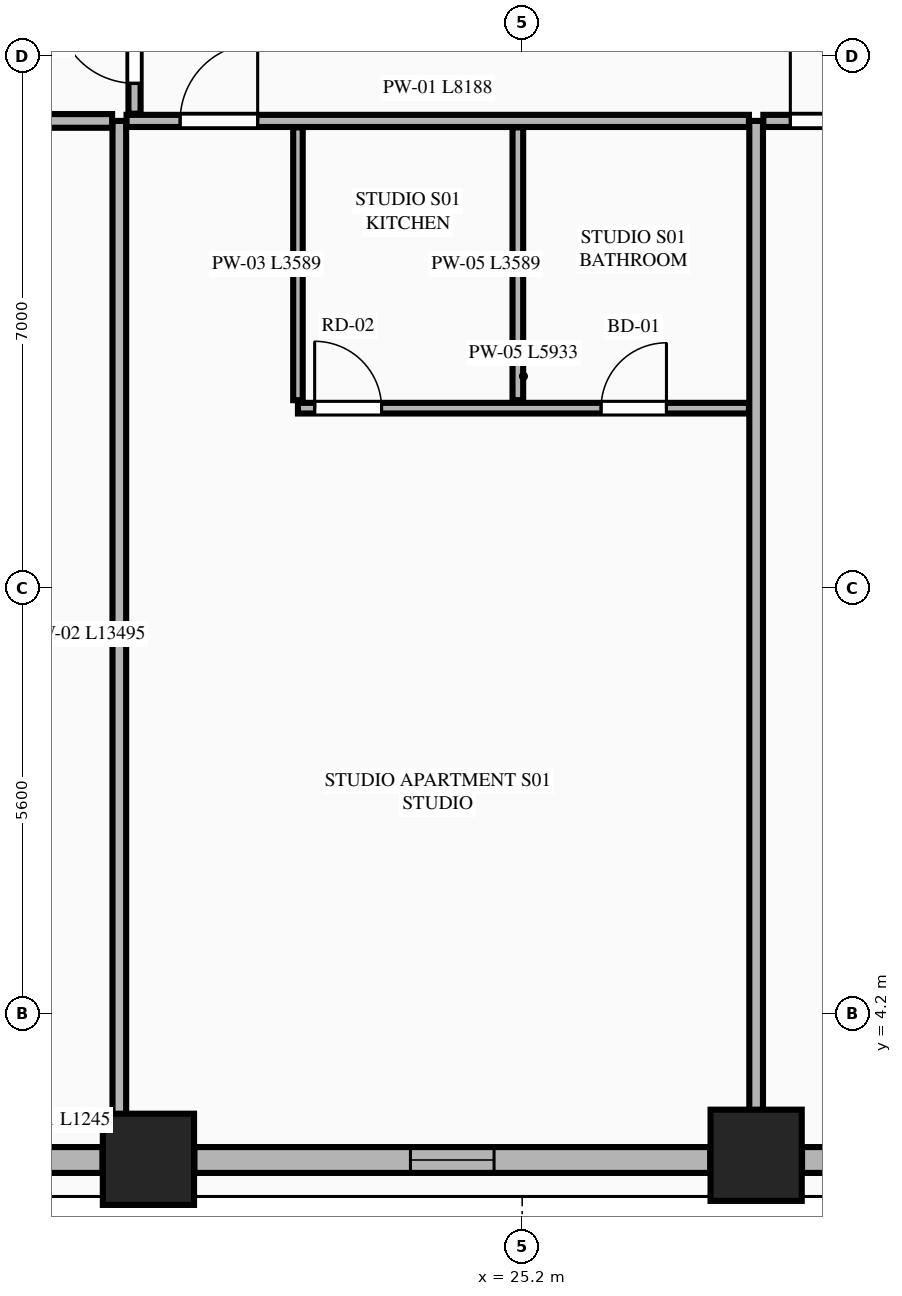
"""IFC4 building model, lengths in metres.
Left out: names, types, materials, properties, quantities, classifications, styles, units other than length and angle.
Written with IfcOpenShell. Run it as: python <this file> out.ifc"""

import sys

from ifc_helpers import new_model, si_unit, direction, frame, frame_2d, origin, origin_2d, place, context, subcontext, project, spatial, rectangle, extrude, element, fill, save


model = new_model("IFC4")
c1 = context("Model", 3, precision=1e-05, world=origin(), true_north=direction((0.0, 1.0)))
c2 = subcontext(c1, "Body", "Model", "MODEL_VIEW")
j1 = project(units=[si_unit("LENGTHUNIT", "METRE"), si_unit("PLANEANGLEUNIT", "RADIAN")], contexts=[c1])
p1 = place(None, origin())
s1 = spatial("IfcSite", under=j1, at=p1, CompositionType="ELEMENT")
p2 = place(p1, origin())
s2 = spatial("IfcBuilding", under=s1, at=p2, CompositionType="ELEMENT")
p3 = place(p2, frame((0.0, 0.0, 60.4)))
s3 = spatial("IfcBuildingStorey", under=s2, at=p3, CompositionType="ELEMENT", Elevation=60.4)
for number, where, z_axis, x_axis in (
    (1, (20.283, 2.289, 0.0), (0.0, 0.0, 1.0), (1.0, 0.0, 0.0)),
    (2, (28.278, 2.342, 0.0), (0.0, 0.0, 1.0), (1.0, 0.0, 0.0)),
):
    element("IfcColumn", number, at=place(p3, frame(where, z_axis=z_axis, x_axis=x_axis)), inside=s3, PredefinedType="COLUMN", context=c2, shape_type="SweptSolid", body=[
        extrude(rectangle(XDim=1.2, YDim=1.2, at=origin_2d()), origin(), (0.0, 0.0, 1.0), 3.55),
    ])
p4 = place(p3, frame((18.434, 2.28, 0.0), z_axis=(0.0, 0.0, 1.0), x_axis=(1.0, 0.0, 0.0)))
e3 = element("IfcWall", 3, at=p4, inside=s3, PredefinedType="STANDARD", context=c2, shape_type="SweptSolid", body=[
    extrude(rectangle(XDim=1.245, YDim=0.34, at=frame_2d((0.623, 0.0))), origin(), (0.0, 0.0, 1.0), 3.33),
])
p5 = place(p3, frame((20.887, 2.28, 0.0), z_axis=(0.0, 0.0, 1.0), x_axis=(1.0, 0.0, 0.0)))
e4 = element("IfcWall", 4, at=p5, inside=s3, PredefinedType="STANDARD", context=c2, shape_type="SweptSolid", body=[
    extrude(rectangle(XDim=6.787, YDim=0.34, at=frame_2d((3.394, 0.0))), origin(), (0.0, 0.0, 1.0), 2.787),
])
p6 = place(p5, frame((2.843, 0.0, 0.75)))
e5 = element("IfcOpeningElement", 5, at=p6, cuts=e4, PredefinedType="OPENING", context=c2, shape_type="SweptSolid", body=[
    extrude(rectangle(XDim=1.1, YDim=1.887, at=frame_2d((0.55, 0.943))), frame((0.0, 0.18, 0.0), z_axis=(0.0, -1.0, 0.0), x_axis=(1.0, 0.0, 0.0)), (0.0, 0.0, 1.0), 0.36),
])
p7 = place(p3, frame((28.882, 2.28, 0.0), z_axis=(0.0, 0.0, 1.0), x_axis=(1.0, 0.0, 0.0)))
e6 = element("IfcWall", 6, at=p7, inside=s3, PredefinedType="STANDARD", context=c2, shape_type="SweptSolid", body=[
    extrude(rectangle(XDim=7.036, YDim=0.34, at=frame_2d((3.518, 0.0))), origin(), (0.0, 0.0, 1.0), 2.787),
])
p8 = place(p7, frame((2.968, 0.0, 0.75)))
e7 = element("IfcOpeningElement", 7, at=p8, cuts=e6, PredefinedType="OPENING", context=c2, shape_type="SweptSolid", body=[
    extrude(rectangle(XDim=1.1, YDim=1.887, at=frame_2d((0.55, 0.943))), frame((0.0, 0.18, 0.0), z_axis=(0.0, -1.0, 0.0), x_axis=(1.0, 0.0, 0.0)), (0.0, 0.0, 1.0), 0.36),
])
p9 = place(p3, frame((19.9, 2.455, 0.0), z_axis=(0.0, 0.0, 1.0), x_axis=(0.0, 1.0, 0.0)))
e8 = element("IfcWall", 8, at=p9, inside=s3, PredefinedType="PARTITIONING", context=c2, shape_type="SweptSolid", body=[
    extrude(rectangle(XDim=13.495, YDim=0.18, at=frame_2d((6.748, 0.0))), origin(), (0.0, 0.0, 1.0), 3.33),
])
p10 = place(p3, frame((28.278, 2.455, 0.0), z_axis=(0.0, 0.0, 1.0), x_axis=(0.0, 1.0, 0.0)))
e9 = element("IfcWall", 9, at=p10, inside=s3, PredefinedType="PARTITIONING", context=c2, shape_type="SweptSolid", body=[
    extrude(rectangle(XDim=13.495, YDim=0.18, at=frame_2d((6.748, 0.0))), origin(), (0.0, 0.0, 1.0), 2.636),
])
p11 = place(p3, frame((19.995, 15.95, 0.0), z_axis=(0.0, 0.0, 1.0), x_axis=(1.0, 0.0, 0.0)))
e10 = element("IfcWall", 10, at=p11, inside=s3, PredefinedType="PARTITIONING", context=c2, shape_type="SweptSolid", body=[
    extrude(rectangle(XDim=8.188, YDim=0.16, at=frame_2d((4.094, 0.0))), origin(), (0.0, 0.0, 1.0), 3.33),
])
p12 = place(p11, frame((0.705, 0.0, 0.0)))
e11 = element("IfcOpeningElement", 11, at=p12, cuts=e10, PredefinedType="OPENING", context=c2, shape_type="SweptSolid", body=[
    extrude(rectangle(XDim=1.02, YDim=2.25, at=frame_2d((0.51, 1.125))), frame((0.0, 0.09, 0.0), z_axis=(0.0, -1.0, 0.0), x_axis=(1.0, 0.0, 0.0)), (0.0, 0.0, 1.0), 0.18),
])
p13 = place(p3, frame((22.25, 12.276, 0.0), z_axis=(0.0, 0.0, 1.0), x_axis=(0.0, 1.0, 0.0)))
e12 = element("IfcWall", 12, at=p13, inside=s3, PredefinedType="PARTITIONING", context=c2, shape_type="SweptSolid", body=[
    extrude(rectangle(XDim=3.589, YDim=0.125, at=frame_2d((1.794, 0.0))), origin(), (0.0, 0.0, 1.0), 2.636),
])
p14 = place(p3, frame((22.25, 12.171, 0.0), z_axis=(0.0, 0.0, 1.0), x_axis=(1.0, 0.0, 0.0)))
e13 = element("IfcWall", 13, at=p14, inside=s3, PredefinedType="PLUMBINGWALL", context=c2, shape_type="SweptSolid", body=[
    extrude(rectangle(XDim=5.933, YDim=0.14, at=frame_2d((2.967, 0.0))), origin(), (0.0, 0.0, 1.0), 3.33),
])
p15 = place(p14, frame((3.988, 0.0, 0.0)))
e14 = element("IfcOpeningElement", 14, at=p15, cuts=e13, PredefinedType="OPENING", context=c2, shape_type="SweptSolid", body=[
    extrude(rectangle(XDim=0.86, YDim=2.1, at=frame_2d((0.43, 1.05))), frame((0.0, 0.08, 0.0), z_axis=(0.0, -1.0, 0.0), x_axis=(1.0, 0.0, 0.0)), (0.0, 0.0, 1.0), 0.16),
])
p16 = place(p14, frame((0.22, 0.0, 0.0)))
e15 = element("IfcOpeningElement", 15, at=p16, cuts=e13, PredefinedType="OPENING", context=c2, shape_type="SweptSolid", body=[
    extrude(rectangle(XDim=0.88, YDim=2.15, at=frame_2d((0.44, 1.075))), frame((0.0, 0.08, 0.0), z_axis=(0.0, -1.0, 0.0), x_axis=(1.0, 0.0, 0.0)), (0.0, 0.0, 1.0), 0.16),
])
p17 = place(p3, frame((25.143, 12.276, 0.0), z_axis=(0.0, 0.0, 1.0), x_axis=(0.0, 1.0, 0.0)))
e16 = element("IfcWall", 16, at=p17, inside=s3, PredefinedType="PLUMBINGWALL", context=c2, shape_type="SweptSolid", body=[
    extrude(rectangle(XDim=3.589, YDim=0.14, at=frame_2d((1.794, 0.0))), origin(), (0.0, 0.0, 1.0), 3.33),
])
p18 = place(p3, frame((28.373, 15.95, 0.0), z_axis=(0.0, 0.0, 1.0), x_axis=(1.0, 0.0, 0.0)))
e17 = element("IfcWall", 17, at=p18, inside=s3, PredefinedType="PARTITIONING", context=c2, shape_type="SweptSolid", body=[
    extrude(rectangle(XDim=8.054, YDim=0.16, at=frame_2d((4.027, 0.0))), origin(), (0.0, 0.0, 1.0), 3.33),
])
p19 = place(p18, frame((0.355, 0.0, 0.0)))
e18 = element("IfcOpeningElement", 18, at=p19, cuts=e17, PredefinedType="OPENING", context=c2, shape_type="SweptSolid", body=[
    extrude(rectangle(XDim=1.02, YDim=2.25, at=frame_2d((0.51, 1.125))), frame((0.0, 0.09, 0.0), z_axis=(0.0, -1.0, 0.0), x_axis=(1.0, 0.0, 0.0)), (0.0, 0.0, 1.0), 0.18),
])
p20 = place(p3, frame((10.564, 15.95, 0.0), z_axis=(0.0, 0.0, 1.0), x_axis=(1.0, 0.0, 0.0)))
e19 = element("IfcWall", 19, at=p20, inside=s3, PredefinedType="PARTITIONING", context=c2, shape_type="SweptSolid", body=[
    extrude(rectangle(XDim=9.241, YDim=0.18, at=frame_2d((4.621, 0.0))), origin(), (0.0, 0.0, 1.0), 3.33),
])
p21 = place(p3, frame((20.1, 16.045, 0.0), z_axis=(0.0, 0.0, 1.0), x_axis=(0.0, 1.0, 0.0)))
e20 = element("IfcWall", 20, at=p21, inside=s3, PredefinedType="PARTITIONING", context=c2, shape_type="SweptSolid", body=[
    extrude(rectangle(XDim=19.71, YDim=0.16, at=frame_2d((9.855, 0.0))), origin(), (0.0, 0.0, 1.0), 3.33),
])
p22 = place(p21, frame((0.4, 0.0, 0.0)))
e21 = element("IfcOpeningElement", 21, at=p22, cuts=e20, PredefinedType="OPENING", context=c2, shape_type="SweptSolid", body=[
    extrude(rectangle(XDim=1.02, YDim=2.25, at=frame_2d((0.51, 1.125))), frame((0.0, 0.09, 0.0), z_axis=(0.0, -1.0, 0.0), x_axis=(1.0, 0.0, 0.0)), (0.0, 0.0, 1.0), 0.18),
])
p23 = place(p6, origin())
e22 = element("IfcWindow", 22, at=p23, inside=s3, PartitioningType="SINGLE_PANEL", PredefinedType="WINDOW", context=c2, shape_type="SweptSolid", body=[
    extrude(rectangle(XDim=1.1, YDim=1.887, at=frame_2d((0.55, 0.943))), frame((0.0, 0.03, 0.0), z_axis=(0.0, -1.0, 0.0), x_axis=(1.0, 0.0, 0.0)), (0.0, 0.0, 1.0), 0.06),
])
fill(e5, e22)
p24 = place(p15, origin())
e23 = element("IfcDoor", 23, at=p24, inside=s3, OperationType="SINGLE_SWING_RIGHT", PredefinedType="DOOR", context=c2, shape_type="SweptSolid", body=[
    extrude(rectangle(XDim=0.86, YDim=2.1, at=frame_2d((0.43, 1.05))), frame((0.0, 0.025, 0.0), z_axis=(0.0, -1.0, 0.0), x_axis=(1.0, 0.0, 0.0)), (0.0, 0.0, 1.0), 0.05),
])
fill(e14, e23)
p25 = place(p12, origin())
e24 = element("IfcDoor", 24, at=p25, inside=s3, OperationType="SINGLE_SWING_RIGHT", PredefinedType="DOOR", context=c2, shape_type="SweptSolid", body=[
    extrude(rectangle(XDim=1.02, YDim=2.25, at=frame_2d((0.51, 1.125))), frame((0.0, 0.025, 0.0), z_axis=(0.0, -1.0, 0.0), x_axis=(1.0, 0.0, 0.0)), (0.0, 0.0, 1.0), 0.05),
])
fill(e11, e24)
p26 = place(p16, origin())
e25 = element("IfcDoor", 25, at=p26, inside=s3, OperationType="SINGLE_SWING_LEFT", PredefinedType="DOOR", context=c2, shape_type="SweptSolid", body=[
    extrude(rectangle(XDim=0.88, YDim=2.15, at=frame_2d((0.44, 1.075))), frame((0.0, 0.025, 0.0), z_axis=(0.0, -1.0, 0.0), x_axis=(1.0, 0.0, 0.0)), (0.0, 0.0, 1.0), 0.05),
])
fill(e15, e25)
p27 = place(p19, origin())
e26 = element("IfcDoor", 26, at=p27, inside=s3, OperationType="SINGLE_SWING_LEFT", PredefinedType="DOOR", context=c2, shape_type="SweptSolid", body=[
    extrude(rectangle(XDim=1.02, YDim=2.25, at=frame_2d((0.51, 1.125))), frame((0.0, 0.025, 0.0), z_axis=(0.0, -1.0, 0.0), x_axis=(1.0, 0.0, 0.0)), (0.0, 0.0, 1.0), 0.05),
])
fill(e18, e26)
p28 = place(p22, origin())
e27 = element("IfcDoor", 27, at=p28, inside=s3, OperationType="SINGLE_SWING_RIGHT", PredefinedType="DOOR", context=c2, shape_type="SweptSolid", body=[
    extrude(rectangle(XDim=1.02, YDim=2.25, at=frame_2d((0.51, 1.125))), frame((0.0, 0.025, 0.0), z_axis=(0.0, -1.0, 0.0), x_axis=(1.0, 0.0, 0.0)), (0.0, 0.0, 1.0), 0.05),
])
fill(e21, e27)
save(model, sys.argv[1])
